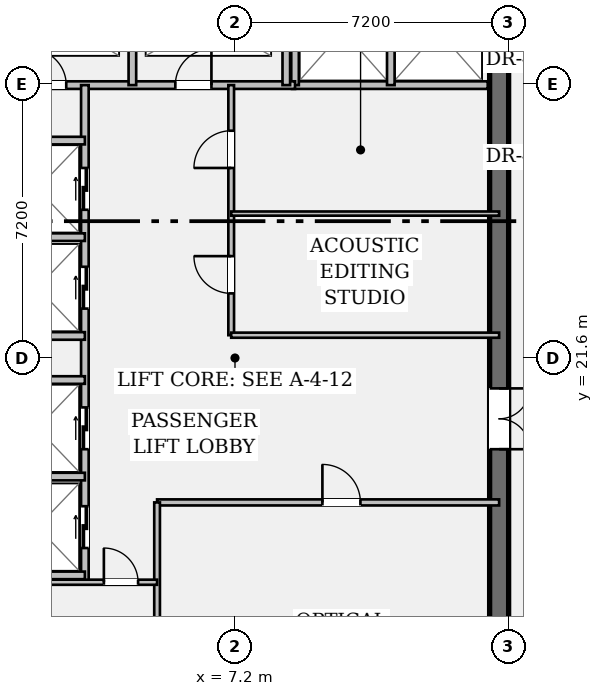
"""IFC4 building model, lengths in metres.
Left out: names, types, materials, properties, quantities, classifications, styles, units other than length and angle.
Written with IfcOpenShell. Run it as: python <this file> out.ifc"""

import sys

from ifc_helpers import new_model, si_unit, direction, frame, frame_2d, origin, place, context, subcontext, project, spatial, rectangle, extrude, element, fill, save


model = new_model("IFC4")
c1 = context("Model", 3, precision=1e-05, world=origin(), true_north=direction((0.0, 1.0)))
c2 = subcontext(c1, "Body", "Model", "MODEL_VIEW")
j1 = project(units=[si_unit("LENGTHUNIT", "METRE"), si_unit("PLANEANGLEUNIT", "RADIAN")], contexts=[c1])
p1 = place(None, origin())
s1 = spatial("IfcSite", under=j1, at=p1, CompositionType="ELEMENT")
p2 = place(p1, origin())
s2 = spatial("IfcBuilding", under=s1, at=p2, CompositionType="ELEMENT")
p3 = place(p2, frame((0.0, 0.0, 204.75)))
s3 = spatial("IfcBuildingStorey", under=s2, at=p3, CompositionType="ELEMENT", Elevation=204.75)
p4 = place(p3, frame((14.15, 35.5, 0.0), z_axis=(0.0, 0.0, 1.0), x_axis=(0.0, -1.0, 0.0)))
e1 = element("IfcWall", 1, at=p4, inside=s3, PredefinedType="SHEAR", context=c2, shape_type="SweptSolid", body=[
    extrude(rectangle(XDim=27.8, YDim=0.5, at=frame_2d((13.9, 0.0))), origin(), (0.0, 0.0, 1.0), 3.24),
])
p5 = place(p4, frame((1.4, 0.0, 0.0)))
e2 = element("IfcOpeningElement", 2, at=p5, cuts=e1, PredefinedType="OPENING", context=c2, shape_type="SweptSolid", body=[
    extrude(rectangle(XDim=1.2, YDim=2.15, at=frame_2d((0.6, 1.075))), frame((0.0, 0.262, 0.0), z_axis=(0.0, -1.0, 0.0), x_axis=(1.0, 0.0, 0.0)), (0.0, 0.0, 1.0), 0.524),
])
p6 = place(p4, frame((25.35, 0.0, 0.0)))
e3 = element("IfcOpeningElement", 3, at=p6, cuts=e1, PredefinedType="OPENING", context=c2, shape_type="SweptSolid", body=[
    extrude(rectangle(XDim=1.2, YDim=2.15, at=frame_2d((0.6, 1.075))), frame((0.0, 0.262, 0.0), z_axis=(0.0, -1.0, 0.0), x_axis=(1.0, 0.0, 0.0)), (0.0, 0.0, 1.0), 0.524),
])
p7 = place(p4, frame((14.7, 0.0, 0.0)))
e4 = element("IfcOpeningElement", 4, at=p7, cuts=e1, PredefinedType="OPENING", context=c2, shape_type="SweptSolid", body=[
    extrude(rectangle(XDim=1.6, YDim=2.2, at=frame_2d((0.8, 1.1))), frame((0.0, 0.262, 0.0), z_axis=(0.0, -1.0, 0.0), x_axis=(1.0, 0.0, 0.0)), (0.0, 0.0, 1.0), 0.524),
])
p8 = place(p3, frame((8.7, 28.78, 0.0), z_axis=(0.0, 0.0, 1.0), x_axis=(1.0, 0.0, 0.0)))
e5 = element("IfcWall", 5, at=p8, inside=s3, PredefinedType="PARTITIONING", context=c2, shape_type="SweptSolid", body=[
    extrude(rectangle(XDim=5.15, YDim=0.2, at=frame_2d((2.575, 0.0))), origin(), (0.0, 0.0, 1.0), 3.24),
])
for number, where, z_axis, x_axis in (
    (6, (8.78, 28.78, 0.0), (0.0, 0.0, 1.0), (0.0, 1.0, 0.0)),
    (7, (11.3, 28.78, 0.0), (0.0, 0.0, 1.0), (0.0, 1.0, 0.0)),
):
    element("IfcWall", number, at=place(p3, frame(where, z_axis=z_axis, x_axis=x_axis)), inside=s3, PredefinedType="PARTITIONING", context=c2, shape_type="SweptSolid", body=[
        extrude(rectangle(XDim=3.1, YDim=0.2, at=frame_2d((1.55, 0.0))), origin(), (0.0, 0.0, 1.0), 3.24),
    ])
p9 = place(p3, frame((0.6, 28.78, 0.0), z_axis=(0.0, 0.0, 1.0), x_axis=(1.0, 0.0, 0.0)))
e8 = element("IfcWall", 8, at=p9, inside=s3, PredefinedType="PARTITIONING", context=c2, shape_type="SweptSolid", body=[
    extrude(rectangle(XDim=8.18, YDim=0.2, at=frame_2d((4.09, 0.0))), origin(), (0.0, 0.0, 1.0), 3.24),
])
p10 = place(p9, frame((1.21, 0.0, 0.0)))
e9 = element("IfcOpeningElement", 9, at=p10, cuts=e8, PredefinedType="OPENING", context=c2, shape_type="SweptSolid", body=[
    extrude(rectangle(XDim=0.95, YDim=2.15, at=frame_2d((0.475, 1.075))), frame((0.0, 0.112, 0.0), z_axis=(0.0, -1.0, 0.0), x_axis=(1.0, 0.0, 0.0)), (0.0, 0.0, 1.0), 0.224),
])
p11 = place(p9, frame((5.03, 0.0, 0.0)))
e10 = element("IfcOpeningElement", 10, at=p11, cuts=e8, PredefinedType="OPENING", context=c2, shape_type="SweptSolid", body=[
    extrude(rectangle(XDim=0.95, YDim=2.15, at=frame_2d((0.475, 1.075))), frame((0.0, 0.112, 0.0), z_axis=(0.0, -1.0, 0.0), x_axis=(1.0, 0.0, 0.0)), (0.0, 0.0, 1.0), 0.224),
])
for number, where, z_axis, x_axis in (
    (11, (4.5, 28.78, 0.0), (0.0, 0.0, 1.0), (0.0, 1.0, 0.0)),
    (12, (8.55, 28.78, 0.0), (0.0, 0.0, 1.0), (0.0, 1.0, 0.0)),
):
    element("IfcWall", number, at=place(p3, frame(where, z_axis=z_axis, x_axis=x_axis)), inside=s3, PredefinedType="PARTITIONING", context=c2, shape_type="SweptSolid", body=[
        extrude(rectangle(XDim=2.94, YDim=0.2, at=frame_2d((1.47, 0.0))), origin(), (0.0, 0.0, 1.0), 3.24),
    ])
p12 = place(p3, frame((3.25, 15.7, 0.0), z_axis=(0.0, 0.0, 1.0), x_axis=(0.0, 1.0, 0.0)))
e13 = element("IfcWall", 13, at=p12, inside=s3, PredefinedType="PARTITIONING", context=c2, shape_type="SweptSolid", body=[
    extrude(rectangle(XDim=13.08, YDim=0.2, at=frame_2d((6.54, 0.0))), origin(), (0.0, 0.0, 1.0), 3.24),
])
p13 = place(p12, frame((0.9, 0.0, 0.0)))
e14 = element("IfcOpeningElement", 14, at=p13, cuts=e13, PredefinedType="OPENING", context=c2, shape_type="SweptSolid", body=[
    extrude(rectangle(XDim=1.1, YDim=2.2, at=frame_2d((0.55, 1.1))), frame((0.0, 0.112, 0.0), z_axis=(0.0, -1.0, 0.0), x_axis=(1.0, 0.0, 0.0)), (0.0, 0.0, 1.0), 0.224),
])
p14 = place(p12, frame((3.5, 0.0, 0.0)))
e15 = element("IfcOpeningElement", 15, at=p14, cuts=e13, PredefinedType="OPENING", context=c2, shape_type="SweptSolid", body=[
    extrude(rectangle(XDim=1.1, YDim=2.2, at=frame_2d((0.55, 1.1))), frame((0.0, 0.112, 0.0), z_axis=(0.0, -1.0, 0.0), x_axis=(1.0, 0.0, 0.0)), (0.0, 0.0, 1.0), 0.224),
])
p15 = place(p12, frame((7.2, 0.0, 0.0)))
e16 = element("IfcOpeningElement", 16, at=p15, cuts=e13, PredefinedType="OPENING", context=c2, shape_type="SweptSolid", body=[
    extrude(rectangle(XDim=1.1, YDim=2.2, at=frame_2d((0.55, 1.1))), frame((0.0, 0.112, 0.0), z_axis=(0.0, -1.0, 0.0), x_axis=(1.0, 0.0, 0.0)), (0.0, 0.0, 1.0), 0.224),
])
p16 = place(p12, frame((9.8, 0.0, 0.0)))
e17 = element("IfcOpeningElement", 17, at=p16, cuts=e13, PredefinedType="OPENING", context=c2, shape_type="SweptSolid", body=[
    extrude(rectangle(XDim=1.1, YDim=2.2, at=frame_2d((0.55, 1.1))), frame((0.0, 0.112, 0.0), z_axis=(0.0, -1.0, 0.0), x_axis=(1.0, 0.0, 0.0)), (0.0, 0.0, 1.0), 0.224),
])
for number, where, z_axis, x_axis in (
    (18, (0.6, 15.88, 0.0), (0.0, 0.0, 1.0), (1.0, 0.0, 0.0)),
    (19, (0.6, 18.48, 0.0), (0.0, 0.0, 1.0), (1.0, 0.0, 0.0)),
    (20, (0.6, 22.18, 0.0), (0.0, 0.0, 1.0), (1.0, 0.0, 0.0)),
    (21, (0.6, 24.78, 0.0), (0.0, 0.0, 1.0), (1.0, 0.0, 0.0)),
    (22, (0.6, 21.02, 0.0), (0.0, 0.0, 1.0), (1.0, 0.0, 0.0)),
    (23, (0.6, 27.32, 0.0), (0.0, 0.0, 1.0), (1.0, 0.0, 0.0)),
):
    element("IfcWall", number, at=place(p3, frame(where, z_axis=z_axis, x_axis=x_axis)), inside=s3, PredefinedType="PARTITIONING", context=c2, shape_type="SweptSolid", body=[
        extrude(rectangle(XDim=2.65, YDim=0.2, at=frame_2d((1.325, 0.0))), origin(), (0.0, 0.0, 1.0), 3.24),
    ])
p17 = place(p3, frame((7.1, 22.2, 0.0), z_axis=(0.0, 0.0, 1.0), x_axis=(0.0, 1.0, 0.0)))
e24 = element("IfcWall", 24, at=p17, inside=s3, PredefinedType="PARTITIONING", context=c2, shape_type="SweptSolid", body=[
    extrude(rectangle(XDim=6.58, YDim=0.15, at=frame_2d((3.29, 0.0))), origin(), (0.0, 0.0, 1.0), 3.24),
])
p18 = place(p17, frame((1.1, 0.0, 0.0)))
e25 = element("IfcOpeningElement", 25, at=p18, cuts=e24, PredefinedType="OPENING", context=c2, shape_type="SweptSolid", body=[
    extrude(rectangle(XDim=0.98, YDim=2.15, at=frame_2d((0.49, 1.075))), frame((0.0, 0.087, 0.0), z_axis=(0.0, -1.0, 0.0), x_axis=(1.0, 0.0, 0.0)), (0.0, 0.0, 1.0), 0.174),
])
p19 = place(p17, frame((4.4, 0.0, 0.0)))
e26 = element("IfcOpeningElement", 26, at=p19, cuts=e24, PredefinedType="OPENING", context=c2, shape_type="SweptSolid", body=[
    extrude(rectangle(XDim=0.98, YDim=2.15, at=frame_2d((0.49, 1.075))), frame((0.0, 0.087, 0.0), z_axis=(0.0, -1.0, 0.0), x_axis=(1.0, 0.0, 0.0)), (0.0, 0.0, 1.0), 0.174),
])
p20 = place(p3, frame((7.1, 22.2, 0.0), z_axis=(0.0, 0.0, 1.0), x_axis=(1.0, 0.0, 0.0)))
e27 = element("IfcWall", 27, at=p20, inside=s3, PredefinedType="PARTITIONING", context=c2, shape_type="SweptSolid", body=[
    extrude(rectangle(XDim=7.05, YDim=0.135, at=frame_2d((3.525, 0.0))), origin(), (0.0, 0.0, 1.0), 3.24),
])
p21 = place(p3, frame((7.1, 25.4, 0.0), z_axis=(0.0, 0.0, 1.0), x_axis=(1.0, 0.0, 0.0)))
e28 = element("IfcWall", 28, at=p21, inside=s3, PredefinedType="PARTITIONING", context=c2, shape_type="SweptSolid", body=[
    extrude(rectangle(XDim=7.05, YDim=0.11, at=frame_2d((3.525, 0.0))), origin(), (0.0, 0.0, 1.0), 3.24),
])
p22 = place(p3, frame((5.15, 17.8, 0.0), z_axis=(0.0, 0.0, 1.0), x_axis=(1.0, 0.0, 0.0)))
e29 = element("IfcWall", 29, at=p22, inside=s3, PredefinedType="PARTITIONING", context=c2, shape_type="SweptSolid", body=[
    extrude(rectangle(XDim=9.0, YDim=0.16, at=frame_2d((4.5, 0.0))), origin(), (0.0, 0.0, 1.0), 3.24),
])
p23 = place(p22, frame((4.35, 0.0, 0.0)))
e30 = element("IfcOpeningElement", 30, at=p23, cuts=e29, PredefinedType="OPENING", context=c2, shape_type="SweptSolid", body=[
    extrude(rectangle(XDim=1.0, YDim=2.15, at=frame_2d((0.5, 1.075))), frame((0.0, 0.092, 0.0), z_axis=(0.0, -1.0, 0.0), x_axis=(1.0, 0.0, 0.0)), (0.0, 0.0, 1.0), 0.184),
])
p24 = place(p3, frame((5.15, 11.2, 0.0), z_axis=(0.0, 0.0, 1.0), x_axis=(0.0, 1.0, 0.0)))
e31 = element("IfcWall", 31, at=p24, inside=s3, PredefinedType="PARTITIONING", context=c2, shape_type="SweptSolid", body=[
    extrude(rectangle(XDim=6.6, YDim=0.15, at=frame_2d((3.3, 0.0))), origin(), (0.0, 0.0, 1.0), 3.24),
])
p25 = place(p3, frame((0.6, 15.7, 0.0), z_axis=(0.0, 0.0, 1.0), x_axis=(1.0, 0.0, 0.0)))
e32 = element("IfcWall", 32, at=p25, inside=s3, PredefinedType="PARTITIONING", context=c2, shape_type="SweptSolid", body=[
    extrude(rectangle(XDim=4.55, YDim=0.135, at=frame_2d((2.275, 0.0))), origin(), (0.0, 0.0, 1.0), 3.24),
])
p26 = place(p25, frame((3.15, 0.0, 0.0)))
e33 = element("IfcOpeningElement", 33, at=p26, cuts=e32, PredefinedType="OPENING", context=c2, shape_type="SweptSolid", body=[
    extrude(rectangle(XDim=0.9, YDim=2.15, at=frame_2d((0.45, 1.075))), frame((0.0, 0.08, 0.0), z_axis=(0.0, -1.0, 0.0), x_axis=(1.0, 0.0, 0.0)), (0.0, 0.0, 1.0), 0.159),
])
p27 = place(p10, origin())
e34 = element("IfcDoor", 34, at=p27, inside=s3, OperationType="SINGLE_SWING_LEFT", PredefinedType="DOOR", context=c2, shape_type="SweptSolid", body=[
    extrude(rectangle(XDim=0.95, YDim=2.15, at=frame_2d((0.475, 1.075))), frame((0.0, 0.025, 0.0), z_axis=(0.0, -1.0, 0.0), x_axis=(1.0, 0.0, 0.0)), (0.0, 0.0, 1.0), 0.05),
])
fill(e9, e34)
p28 = place(p11, origin())
e35 = element("IfcDoor", 35, at=p28, inside=s3, OperationType="SINGLE_SWING_RIGHT", PredefinedType="DOOR", context=c2, shape_type="SweptSolid", body=[
    extrude(rectangle(XDim=0.95, YDim=2.15, at=frame_2d((0.475, 1.075))), frame((0.0, 0.025, 0.0), z_axis=(0.0, -1.0, 0.0), x_axis=(1.0, 0.0, 0.0)), (0.0, 0.0, 1.0), 0.05),
])
fill(e10, e35)
p29 = place(p7, origin())
e36 = element("IfcDoor", 36, at=p29, inside=s3, OperationType="DOUBLE_DOOR_SINGLE_SWING", PredefinedType="DOOR", context=c2, shape_type="SweptSolid", body=[
    extrude(rectangle(XDim=1.6, YDim=2.2, at=frame_2d((0.8, 1.1))), frame((0.0, 0.025, 0.0), z_axis=(0.0, -1.0, 0.0), x_axis=(1.0, 0.0, 0.0)), (0.0, 0.0, 1.0), 0.05),
])
fill(e4, e36)
p30 = place(p13, origin())
e37 = element("IfcDoor", 37, at=p30, inside=s3, OperationType="DOUBLE_DOOR_SLIDING", PredefinedType="DOOR", context=c2, shape_type="SweptSolid", body=[
    extrude(rectangle(XDim=1.1, YDim=2.2, at=frame_2d((0.55, 1.1))), frame((0.0, 0.025, 0.0), z_axis=(0.0, -1.0, 0.0), x_axis=(1.0, 0.0, 0.0)), (0.0, 0.0, 1.0), 0.05),
])
fill(e14, e37)
p31 = place(p14, origin())
e38 = element("IfcDoor", 38, at=p31, inside=s3, OperationType="DOUBLE_DOOR_SLIDING", PredefinedType="DOOR", context=c2, shape_type="SweptSolid", body=[
    extrude(rectangle(XDim=1.1, YDim=2.2, at=frame_2d((0.55, 1.1))), frame((0.0, 0.025, 0.0), z_axis=(0.0, -1.0, 0.0), x_axis=(1.0, 0.0, 0.0)), (0.0, 0.0, 1.0), 0.05),
])
fill(e15, e38)
p32 = place(p15, origin())
e39 = element("IfcDoor", 39, at=p32, inside=s3, OperationType="DOUBLE_DOOR_SLIDING", PredefinedType="DOOR", context=c2, shape_type="SweptSolid", body=[
    extrude(rectangle(XDim=1.1, YDim=2.2, at=frame_2d((0.55, 1.1))), frame((0.0, 0.025, 0.0), z_axis=(0.0, -1.0, 0.0), x_axis=(1.0, 0.0, 0.0)), (0.0, 0.0, 1.0), 0.05),
])
fill(e16, e39)
p33 = place(p16, origin())
e40 = element("IfcDoor", 40, at=p33, inside=s3, OperationType="DOUBLE_DOOR_SLIDING", PredefinedType="DOOR", context=c2, shape_type="SweptSolid", body=[
    extrude(rectangle(XDim=1.1, YDim=2.2, at=frame_2d((0.55, 1.1))), frame((0.0, 0.025, 0.0), z_axis=(0.0, -1.0, 0.0), x_axis=(1.0, 0.0, 0.0)), (0.0, 0.0, 1.0), 0.05),
])
fill(e17, e40)
p34 = place(p18, origin())
e41 = element("IfcDoor", 41, at=p34, inside=s3, OperationType="SINGLE_SWING_RIGHT", PredefinedType="DOOR", context=c2, shape_type="SweptSolid", body=[
    extrude(rectangle(XDim=0.98, YDim=2.15, at=frame_2d((0.49, 1.075))), frame((0.0, 0.025, 0.0), z_axis=(0.0, -1.0, 0.0), x_axis=(1.0, 0.0, 0.0)), (0.0, 0.0, 1.0), 0.05),
])
fill(e25, e41)
p35 = place(p19, origin())
e42 = element("IfcDoor", 42, at=p35, inside=s3, OperationType="SINGLE_SWING_LEFT", PredefinedType="DOOR", context=c2, shape_type="SweptSolid", body=[
    extrude(rectangle(XDim=0.98, YDim=2.15, at=frame_2d((0.49, 1.075))), frame((0.0, 0.025, 0.0), z_axis=(0.0, -1.0, 0.0), x_axis=(1.0, 0.0, 0.0)), (0.0, 0.0, 1.0), 0.05),
])
fill(e26, e42)
p36 = place(p23, origin())
e43 = element("IfcDoor", 43, at=p36, inside=s3, OperationType="SINGLE_SWING_LEFT", PredefinedType="DOOR", context=c2, shape_type="SweptSolid", body=[
    extrude(rectangle(XDim=1.0, YDim=2.15, at=frame_2d((0.5, 1.075))), frame((0.0, 0.025, 0.0), z_axis=(0.0, -1.0, 0.0), x_axis=(1.0, 0.0, 0.0)), (0.0, 0.0, 1.0), 0.05),
])
fill(e30, e43)
p37 = place(p26, origin())
e44 = element("IfcDoor", 44, at=p37, inside=s3, OperationType="SINGLE_SWING_LEFT", PredefinedType="DOOR", context=c2, shape_type="SweptSolid", body=[
    extrude(rectangle(XDim=0.9, YDim=2.15, at=frame_2d((0.45, 1.075))), frame((0.0, 0.025, 0.0), z_axis=(0.0, -1.0, 0.0), x_axis=(1.0, 0.0, 0.0)), (0.0, 0.0, 1.0), 0.05),
])
fill(e33, e44)
save(model, sys.argv[1])
